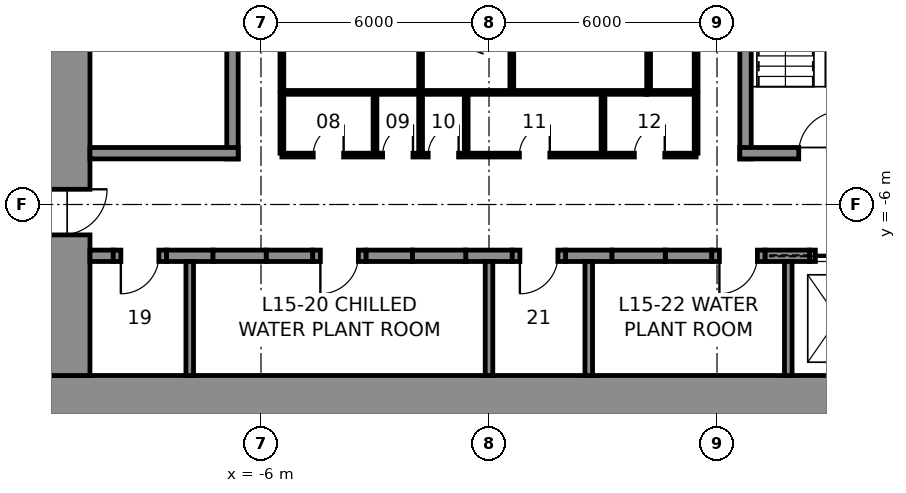
"""IFC4 building model, lengths in metres.
Left out: names, types, materials, properties, quantities, classifications, styles, units other than length and angle.
Written with IfcOpenShell. Run it as: python <this file> out.ifc"""

import sys

from ifc_helpers import new_model, si_unit, direction, frame, frame_2d, origin, place, context, subcontext, project, spatial, rectangle, extrude, element, fill, save


model = new_model("IFC4")
c1 = context("Model", 3, precision=1e-05, world=origin(), true_north=direction((0.0, 1.0)))
c2 = subcontext(c1, "Body", "Model", "MODEL_VIEW")
j1 = project(units=[si_unit("LENGTHUNIT", "METRE"), si_unit("PLANEANGLEUNIT", "RADIAN")], contexts=[c1])
p1 = place(None, origin())
s1 = spatial("IfcSite", under=j1, at=p1, CompositionType="ELEMENT")
p2 = place(p1, origin())
s2 = spatial("IfcBuilding", under=s1, at=p2, CompositionType="ELEMENT")
p3 = place(p2, frame((0.0, 0.0, 81.0)))
s3 = spatial("IfcBuildingStorey", under=s2, at=p3, CompositionType="ELEMENT", Elevation=81.0)
p4 = place(p3, frame((12.0, -11.25, 0.0), z_axis=(0.0, 0.0, 1.0), x_axis=(-1.0, 0.0, 0.0)))
e1 = element("IfcWall", 1, at=p4, inside=s3, PredefinedType="SHEAR", context=c2, shape_type="SweptSolid", body=[
    extrude(rectangle(XDim=24.0, YDim=1.5, at=frame_2d((12.0, 0.0))), origin(), (0.0, 0.0, 1.0), 5.0),
])
p5 = place(p3, frame((-11.25, -10.5, 0.0), z_axis=(0.0, 0.0, 1.0), x_axis=(0.0, 1.0, 0.0)))
e2 = element("IfcWall", 2, at=p5, inside=s3, PredefinedType="SHEAR", context=c2, shape_type="SweptSolid", body=[
    extrude(rectangle(XDim=21.0, YDim=1.5, at=frame_2d((10.5, 0.0))), origin(), (0.0, 0.0, 1.0), 5.0),
])
p6 = place(p5, frame((16.1, 0.0, 0.0)))
e3 = element("IfcOpeningElement", 3, at=p6, cuts=e2, PredefinedType="OPENING", context=c2, shape_type="SweptSolid", body=[
    extrude(rectangle(XDim=1.2, YDim=2.3, at=frame_2d((0.6, 1.15))), frame((0.0, 0.76, 0.0), z_axis=(0.0, -1.0, 0.0), x_axis=(1.0, 0.0, 0.0)), (0.0, 0.0, 1.0), 1.52),
])
p7 = place(p5, frame((3.7, 0.0, 0.0)))
e4 = element("IfcOpeningElement", 4, at=p7, cuts=e2, PredefinedType="OPENING", context=c2, shape_type="SweptSolid", body=[
    extrude(rectangle(XDim=1.2, YDim=2.3, at=frame_2d((0.6, 1.15))), frame((0.0, 0.76, 0.0), z_axis=(0.0, -1.0, 0.0), x_axis=(1.0, 0.0, 0.0)), (0.0, 0.0, 1.0), 1.52),
])
p8 = place(p3, frame((-10.5, -7.35, 0.0), z_axis=(0.0, 0.0, 1.0), x_axis=(1.0, 0.0, 0.0)))
e5 = element("IfcWall", 5, at=p8, inside=s3, PredefinedType="SHEAR", context=c2, shape_type="SweptSolid", body=[
    extrude(rectangle(XDim=0.613, YDim=0.3, at=frame_2d((0.306, 0.0))), origin(), (0.0, 0.0, 1.0), 5.0),
])
for number, where, z_axis, x_axis in (
    (6, (-8.488, -7.35, 0.0), (0.0, 0.0, 1.0), (1.0, 0.0, 0.0)),
    (7, (-5.863, -7.35, 0.0), (0.0, 0.0, 1.0), (1.0, 0.0, 0.0)),
    (8, (-3.238, -7.35, 0.0), (0.0, 0.0, 1.0), (1.0, 0.0, 0.0)),
    (9, (-0.613, -7.35, 0.0), (0.0, 0.0, 1.0), (1.0, 0.0, 0.0)),
    (10, (2.012, -7.35, 0.0), (0.0, 0.0, 1.0), (1.0, 0.0, 0.0)),
    (11, (4.637, -7.35, 0.0), (0.0, 0.0, 1.0), (1.0, 0.0, 0.0)),
):
    element("IfcWall", number, at=place(p3, frame(where, z_axis=z_axis, x_axis=x_axis)), inside=s3, PredefinedType="SHEAR", context=c2, shape_type="SweptSolid", body=[
        extrude(rectangle(XDim=1.225, YDim=0.3, at=frame_2d((0.613, 0.0))), origin(), (0.0, 0.0, 1.0), 5.0),
    ])
p9 = place(p3, frame((7.262, -7.35, 0.0), z_axis=(0.0, 0.0, 1.0), x_axis=(1.0, 0.0, 0.0)))
e12 = element("IfcWall", 12, at=p9, inside=s3, PredefinedType="SHEAR", context=c2, shape_type="SweptSolid", body=[
    extrude(rectangle(XDim=1.175, YDim=0.3, at=frame_2d((0.587, 0.0))), origin(), (0.0, 0.0, 1.0), 5.0),
])
p10 = place(p3, frame((-9.887, -7.35, 0.0), z_axis=(0.0, 0.0, 1.0), x_axis=(1.0, 0.0, 0.0)))
e13 = element("IfcWall", 13, at=p10, inside=s3, PredefinedType="PARTITIONING", context=c2, shape_type="SweptSolid", body=[
    extrude(rectangle(XDim=1.4, YDim=0.3, at=frame_2d((0.7, 0.0))), origin(), (0.0, 0.0, 1.0), 5.0),
])
p11 = place(p10, frame((0.2, 0.0, 0.0)))
e14 = element("IfcOpeningElement", 14, at=p11, cuts=e13, PredefinedType="OPENING", context=c2, shape_type="SweptSolid", body=[
    extrude(rectangle(XDim=1.0, YDim=2.3, at=frame_2d((0.5, 1.15))), frame((0.0, 0.16, 0.0), z_axis=(0.0, -1.0, 0.0), x_axis=(1.0, 0.0, 0.0)), (0.0, 0.0, 1.0), 0.32),
])
p12 = place(p3, frame((-7.262, -7.35, 0.0), z_axis=(0.0, 0.0, 1.0), x_axis=(1.0, 0.0, 0.0)))
e15 = element("IfcWall", 15, at=p12, inside=s3, PredefinedType="PARTITIONING", context=c2, shape_type="SweptSolid", body=[
    extrude(rectangle(XDim=1.4, YDim=0.3, at=frame_2d((0.7, 0.0))), origin(), (0.0, 0.0, 1.0), 5.0),
])
p13 = place(p3, frame((-4.637, -7.35, 0.0), z_axis=(0.0, 0.0, 1.0), x_axis=(1.0, 0.0, 0.0)))
e16 = element("IfcWall", 16, at=p13, inside=s3, PredefinedType="PARTITIONING", context=c2, shape_type="SweptSolid", body=[
    extrude(rectangle(XDim=1.4, YDim=0.3, at=frame_2d((0.7, 0.0))), origin(), (0.0, 0.0, 1.0), 5.0),
])
p14 = place(p13, frame((0.2, 0.0, 0.0)))
e17 = element("IfcOpeningElement", 17, at=p14, cuts=e16, PredefinedType="OPENING", context=c2, shape_type="SweptSolid", body=[
    extrude(rectangle(XDim=1.0, YDim=2.3, at=frame_2d((0.5, 1.15))), frame((0.0, 0.16, 0.0), z_axis=(0.0, -1.0, 0.0), x_axis=(1.0, 0.0, 0.0)), (0.0, 0.0, 1.0), 0.32),
])
p15 = place(p3, frame((-2.012, -7.35, 0.0), z_axis=(0.0, 0.0, 1.0), x_axis=(1.0, 0.0, 0.0)))
e18 = element("IfcWall", 18, at=p15, inside=s3, PredefinedType="PARTITIONING", context=c2, shape_type="SweptSolid", body=[
    extrude(rectangle(XDim=1.4, YDim=0.3, at=frame_2d((0.7, 0.0))), origin(), (0.0, 0.0, 1.0), 5.0),
])
p16 = place(p3, frame((0.613, -7.35, 0.0), z_axis=(0.0, 0.0, 1.0), x_axis=(1.0, 0.0, 0.0)))
e19 = element("IfcWall", 19, at=p16, inside=s3, PredefinedType="PARTITIONING", context=c2, shape_type="SweptSolid", body=[
    extrude(rectangle(XDim=1.4, YDim=0.3, at=frame_2d((0.7, 0.0))), origin(), (0.0, 0.0, 1.0), 5.0),
])
p17 = place(p16, frame((0.2, 0.0, 0.0)))
e20 = element("IfcOpeningElement", 20, at=p17, cuts=e19, PredefinedType="OPENING", context=c2, shape_type="SweptSolid", body=[
    extrude(rectangle(XDim=1.0, YDim=2.3, at=frame_2d((0.5, 1.15))), frame((0.0, 0.16, 0.0), z_axis=(0.0, -1.0, 0.0), x_axis=(1.0, 0.0, 0.0)), (0.0, 0.0, 1.0), 0.32),
])
p18 = place(p3, frame((3.238, -7.35, 0.0), z_axis=(0.0, 0.0, 1.0), x_axis=(1.0, 0.0, 0.0)))
e21 = element("IfcWall", 21, at=p18, inside=s3, PredefinedType="PARTITIONING", context=c2, shape_type="SweptSolid", body=[
    extrude(rectangle(XDim=1.4, YDim=0.3, at=frame_2d((0.7, 0.0))), origin(), (0.0, 0.0, 1.0), 5.0),
])
p19 = place(p3, frame((5.863, -7.35, 0.0), z_axis=(0.0, 0.0, 1.0), x_axis=(1.0, 0.0, 0.0)))
e22 = element("IfcWall", 22, at=p19, inside=s3, PredefinedType="PARTITIONING", context=c2, shape_type="SweptSolid", body=[
    extrude(rectangle(XDim=1.4, YDim=0.3, at=frame_2d((0.7, 0.0))), origin(), (0.0, 0.0, 1.0), 5.0),
])
p20 = place(p19, frame((0.2, 0.0, 0.0)))
e23 = element("IfcOpeningElement", 23, at=p20, cuts=e22, PredefinedType="OPENING", context=c2, shape_type="SweptSolid", body=[
    extrude(rectangle(XDim=1.0, YDim=2.3, at=frame_2d((0.5, 1.15))), frame((0.0, 0.16, 0.0), z_axis=(0.0, -1.0, 0.0), x_axis=(1.0, 0.0, 0.0)), (0.0, 0.0, 1.0), 0.32),
])
p21 = place(p3, frame((8.438, -7.35, 0.0), z_axis=(0.0, 0.0, 1.0), x_axis=(1.0, 0.0, 0.0)))
e24 = element("IfcWall", 24, at=p21, inside=s3, PredefinedType="PARTITIONING", context=c2, shape_type="SweptSolid", body=[
    extrude(rectangle(XDim=1.5, YDim=0.3, at=frame_2d((0.75, 0.0))), origin(), (0.0, 0.0, 1.0), 5.0),
])
p22 = place(p21, frame((0.15, 0.0, 0.0)))
e25 = element("IfcOpeningElement", 25, at=p22, cuts=e24, PredefinedType="OPENING", context=c2, shape_type="SweptSolid", body=[
    extrude(rectangle(XDim=1.2, YDim=2.3, at=frame_2d((0.6, 1.15))), frame((0.0, 0.16, 0.0), z_axis=(0.0, -1.0, 0.0), x_axis=(1.0, 0.0, 0.0)), (0.0, 0.0, 1.0), 0.32),
])
for number, where, z_axis, x_axis in (
    (26, (-7.875, -10.5, 0.0), (0.0, 0.0, 1.0), (0.0, 1.0, 0.0)),
    (27, (0.0, -10.5, 0.0), (0.0, 0.0, 1.0), (0.0, 1.0, 0.0)),
    (28, (2.625, -10.5, 0.0), (0.0, 0.0, 1.0), (0.0, 1.0, 0.0)),
    (29, (7.875, -10.5, 0.0), (0.0, 0.0, 1.0), (0.0, 1.0, 0.0)),
):
    element("IfcWall", number, at=place(p3, frame(where, z_axis=z_axis, x_axis=x_axis)), inside=s3, PredefinedType="PARTITIONING", context=c2, shape_type="SweptSolid", body=[
        extrude(rectangle(XDim=3.0, YDim=0.2, at=frame_2d((1.5, 0.0))), origin(), (0.0, 0.0, 1.0), 5.0),
    ])
p23 = place(p3, frame((-6.75, -4.8, 0.0), z_axis=(0.0, 0.0, 1.0), x_axis=(0.0, 1.0, 0.0)))
e30 = element("IfcWall", 30, at=p23, inside=s3, PredefinedType="SOLIDWALL", context=c2, shape_type="SweptSolid", body=[
    extrude(rectangle(XDim=9.6, YDim=0.3, at=frame_2d((4.8, 0.0))), origin(), (0.0, 0.0, 1.0), 4.75),
])
p24 = place(p3, frame((-6.6, -4.65, 0.0), z_axis=(0.0, 0.0, 1.0), x_axis=(-1.0, 0.0, 0.0)))
e31 = element("IfcWall", 31, at=p24, inside=s3, PredefinedType="SOLIDWALL", context=c2, shape_type="SweptSolid", body=[
    extrude(rectangle(XDim=3.9, YDim=0.3, at=frame_2d((1.95, 0.0))), origin(), (0.0, 0.0, 1.0), 4.75),
])
p25 = place(p3, frame((6.75, -4.8, 0.0), z_axis=(0.0, 0.0, 1.0), x_axis=(0.0, 1.0, 0.0)))
e32 = element("IfcWall", 32, at=p25, inside=s3, PredefinedType="SOLIDWALL", context=c2, shape_type="SweptSolid", body=[
    extrude(rectangle(XDim=9.6, YDim=0.3, at=frame_2d((4.8, 0.0))), origin(), (0.0, 0.0, 1.0), 4.75),
])
p26 = place(p3, frame((10.5, -4.65, 0.0), z_axis=(0.0, 0.0, 1.0), x_axis=(-1.0, 0.0, 0.0)))
e33 = element("IfcWall", 33, at=p26, inside=s3, PredefinedType="SOLIDWALL", context=c2, shape_type="SweptSolid", body=[
    extrude(rectangle(XDim=3.9, YDim=0.3, at=frame_2d((1.95, 0.0))), origin(), (0.0, 0.0, 1.0), 4.75),
])
p27 = place(p26, frame((1.25, 0.0, 0.0)))
e34 = element("IfcOpeningElement", 34, at=p27, cuts=e33, PredefinedType="OPENING", context=c2, shape_type="SweptSolid", body=[
    extrude(rectangle(XDim=1.1, YDim=2.3, at=frame_2d((0.55, 1.15))), frame((0.0, 0.16, 0.0), z_axis=(0.0, -1.0, 0.0), x_axis=(1.0, 0.0, 0.0)), (0.0, 0.0, 1.0), 0.32),
])
p28 = place(p3, frame((4.15, -3.05, 0.0), z_axis=(0.0, 0.0, 1.0), x_axis=(-1.0, 0.0, 0.0)))
e35 = element("IfcWall", 35, at=p28, inside=s3, PredefinedType="PARTITIONING", context=c2, shape_type="SweptSolid", body=[
    extrude(rectangle(XDim=9.6, YDim=0.1, at=frame_2d((4.8, 0.0))), origin(), (0.0, 0.0, 1.0), 4.75),
])
p29 = place(p3, frame((5.45, -3.05, 0.0), z_axis=(0.0, 0.0, 1.0), x_axis=(-1.0, 0.0, 0.0)))
e36 = element("IfcWall", 36, at=p29, inside=s3, PredefinedType="PARTITIONING", context=c2, shape_type="SweptSolid", body=[
    extrude(rectangle(XDim=1.3, YDim=0.1, at=frame_2d((0.65, 0.0))), origin(), (0.0, 0.0, 1.0), 4.75),
])
for number, where, z_axis, x_axis in (
    (37, (5.45, 3.0, 0.0), (0.0, 0.0, 1.0), (0.0, -1.0, 0.0)),
    (38, (-5.45, -3.0, 0.0), (0.0, 0.0, 1.0), (0.0, 1.0, 0.0)),
    (39, (-1.8, -3.0, 0.0), (0.0, 0.0, 1.0), (0.0, 1.0, 0.0)),
    (40, (0.6, -3.0, 0.0), (0.0, 0.0, 1.0), (0.0, 1.0, 0.0)),
    (41, (4.2, -3.0, 0.0), (0.0, 0.0, 1.0), (0.0, 1.0, 0.0)),
):
    element("IfcWall", number, at=place(p3, frame(where, z_axis=z_axis, x_axis=x_axis)), inside=s3, PredefinedType="PARTITIONING", context=c2, shape_type="SweptSolid", body=[
        extrude(rectangle(XDim=6.0, YDim=0.1, at=frame_2d((3.0, 0.0))), origin(), (0.0, 0.0, 1.0), 4.75),
    ])
p30 = place(p3, frame((5.45, -4.7, 0.0), z_axis=(0.0, 0.0, 1.0), x_axis=(-1.0, 0.0, 0.0)))
e42 = element("IfcWall", 42, at=p30, inside=s3, PredefinedType="PARTITIONING", context=c2, shape_type="SweptSolid", body=[
    extrude(rectangle(XDim=10.9, YDim=0.1, at=frame_2d((5.45, 0.0))), origin(), (0.0, 0.0, 1.0), 4.75),
])
p31 = place(p30, frame((9.275, 0.0, 0.0)))
e43 = element("IfcOpeningElement", 43, at=p31, cuts=e42, PredefinedType="OPENING", context=c2, shape_type="SweptSolid", body=[
    extrude(rectangle(XDim=0.8, YDim=2.3, at=frame_2d((0.4, 1.15))), frame((0.0, 0.06, 0.0), z_axis=(0.0, -1.0, 0.0), x_axis=(1.0, 0.0, 0.0)), (0.0, 0.0, 1.0), 0.12),
])
p32 = place(p30, frame((7.45, 0.0, 0.0)))
e44 = element("IfcOpeningElement", 44, at=p32, cuts=e42, PredefinedType="OPENING", context=c2, shape_type="SweptSolid", body=[
    extrude(rectangle(XDim=0.8, YDim=2.3, at=frame_2d((0.4, 1.15))), frame((0.0, 0.06, 0.0), z_axis=(0.0, -1.0, 0.0), x_axis=(1.0, 0.0, 0.0)), (0.0, 0.0, 1.0), 0.12),
])
p33 = place(p30, frame((6.25, 0.0, 0.0)))
e45 = element("IfcOpeningElement", 45, at=p33, cuts=e42, PredefinedType="OPENING", context=c2, shape_type="SweptSolid", body=[
    extrude(rectangle(XDim=0.8, YDim=2.3, at=frame_2d((0.4, 1.15))), frame((0.0, 0.06, 0.0), z_axis=(0.0, -1.0, 0.0), x_axis=(1.0, 0.0, 0.0)), (0.0, 0.0, 1.0), 0.12),
])
p34 = place(p30, frame((3.85, 0.0, 0.0)))
e46 = element("IfcOpeningElement", 46, at=p34, cuts=e42, PredefinedType="OPENING", context=c2, shape_type="SweptSolid", body=[
    extrude(rectangle(XDim=0.8, YDim=2.3, at=frame_2d((0.4, 1.15))), frame((0.0, 0.06, 0.0), z_axis=(0.0, -1.0, 0.0), x_axis=(1.0, 0.0, 0.0)), (0.0, 0.0, 1.0), 0.12),
])
p35 = place(p30, frame((0.825, 0.0, 0.0)))
e47 = element("IfcOpeningElement", 47, at=p35, cuts=e42, PredefinedType="OPENING", context=c2, shape_type="SweptSolid", body=[
    extrude(rectangle(XDim=0.8, YDim=2.3, at=frame_2d((0.4, 1.15))), frame((0.0, 0.06, 0.0), z_axis=(0.0, -1.0, 0.0), x_axis=(1.0, 0.0, 0.0)), (0.0, 0.0, 1.0), 0.12),
])
for number, where, z_axis, x_axis in (
    (48, (-5.45, -3.1, 0.0), (0.0, 0.0, 1.0), (0.0, -1.0, 0.0)),
    (49, (5.45, -3.1, 0.0), (0.0, 0.0, 1.0), (0.0, -1.0, 0.0)),
    (50, (-3.0, -3.1, 0.0), (0.0, 0.0, 1.0), (0.0, -1.0, 0.0)),
    (51, (-1.8, -3.1, 0.0), (0.0, 0.0, 1.0), (0.0, -1.0, 0.0)),
    (52, (-0.6, -3.1, 0.0), (0.0, 0.0, 1.0), (0.0, -1.0, 0.0)),
    (53, (3.0, -3.1, 0.0), (0.0, 0.0, 1.0), (0.0, -1.0, 0.0)),
):
    element("IfcWall", number, at=place(p3, frame(where, z_axis=z_axis, x_axis=x_axis)), inside=s3, PredefinedType="PARTITIONING", context=c2, shape_type="SweptSolid", body=[
        extrude(rectangle(XDim=1.55, YDim=0.1, at=frame_2d((0.775, 0.0))), origin(), (0.0, 0.0, 1.0), 4.75),
    ])
p36 = place(p27, frame((1.1, 0.0, 0.0), z_axis=(0.0, 0.0, 1.0), x_axis=(-1.0, 0.0, 0.0)))
e54 = element("IfcDoor", 54, at=p36, inside=s3, OperationType="SINGLE_SWING_RIGHT", PredefinedType="DOOR", context=c2, shape_type="SweptSolid", body=[
    extrude(rectangle(XDim=1.1, YDim=2.3, at=frame_2d((0.55, 1.15))), frame((0.0, 0.025, 0.0), z_axis=(0.0, -1.0, 0.0), x_axis=(1.0, 0.0, 0.0)), (0.0, 0.0, 1.0), 0.05),
])
fill(e34, e54)
p37 = place(p31, frame((0.8, 0.0, 0.0), z_axis=(0.0, 0.0, 1.0), x_axis=(-1.0, 0.0, 0.0)))
e55 = element("IfcDoor", 55, at=p37, inside=s3, OperationType="SINGLE_SWING_RIGHT", PredefinedType="DOOR", context=c2, shape_type="SweptSolid", body=[
    extrude(rectangle(XDim=0.8, YDim=2.3, at=frame_2d((0.4, 1.15))), frame((0.0, 0.025, 0.0), z_axis=(0.0, -1.0, 0.0), x_axis=(1.0, 0.0, 0.0)), (0.0, 0.0, 1.0), 0.05),
])
fill(e43, e55)
p38 = place(p32, frame((0.8, 0.0, 0.0), z_axis=(0.0, 0.0, 1.0), x_axis=(-1.0, 0.0, 0.0)))
e56 = element("IfcDoor", 56, at=p38, inside=s3, OperationType="SINGLE_SWING_RIGHT", PredefinedType="DOOR", context=c2, shape_type="SweptSolid", body=[
    extrude(rectangle(XDim=0.8, YDim=2.3, at=frame_2d((0.4, 1.15))), frame((0.0, 0.025, 0.0), z_axis=(0.0, -1.0, 0.0), x_axis=(1.0, 0.0, 0.0)), (0.0, 0.0, 1.0), 0.05),
])
fill(e44, e56)
p39 = place(p33, frame((0.8, 0.0, 0.0), z_axis=(0.0, 0.0, 1.0), x_axis=(-1.0, 0.0, 0.0)))
e57 = element("IfcDoor", 57, at=p39, inside=s3, OperationType="SINGLE_SWING_RIGHT", PredefinedType="DOOR", context=c2, shape_type="SweptSolid", body=[
    extrude(rectangle(XDim=0.8, YDim=2.3, at=frame_2d((0.4, 1.15))), frame((0.0, 0.025, 0.0), z_axis=(0.0, -1.0, 0.0), x_axis=(1.0, 0.0, 0.0)), (0.0, 0.0, 1.0), 0.05),
])
fill(e45, e57)
p40 = place(p34, frame((0.8, 0.0, 0.0), z_axis=(0.0, 0.0, 1.0), x_axis=(-1.0, 0.0, 0.0)))
e58 = element("IfcDoor", 58, at=p40, inside=s3, OperationType="SINGLE_SWING_RIGHT", PredefinedType="DOOR", context=c2, shape_type="SweptSolid", body=[
    extrude(rectangle(XDim=0.8, YDim=2.3, at=frame_2d((0.4, 1.15))), frame((0.0, 0.025, 0.0), z_axis=(0.0, -1.0, 0.0), x_axis=(1.0, 0.0, 0.0)), (0.0, 0.0, 1.0), 0.05),
])
fill(e46, e58)
p41 = place(p35, frame((0.8, 0.0, 0.0), z_axis=(0.0, 0.0, 1.0), x_axis=(-1.0, 0.0, 0.0)))
e59 = element("IfcDoor", 59, at=p41, inside=s3, OperationType="SINGLE_SWING_RIGHT", PredefinedType="DOOR", context=c2, shape_type="SweptSolid", body=[
    extrude(rectangle(XDim=0.8, YDim=2.3, at=frame_2d((0.4, 1.15))), frame((0.0, 0.025, 0.0), z_axis=(0.0, -1.0, 0.0), x_axis=(1.0, 0.0, 0.0)), (0.0, 0.0, 1.0), 0.05),
])
fill(e47, e59)
p42 = place(p11, frame((1.0, 0.0, 0.0), z_axis=(0.0, 0.0, 1.0), x_axis=(-1.0, 0.0, 0.0)))
e60 = element("IfcDoor", 60, at=p42, inside=s3, OperationType="SINGLE_SWING_RIGHT", PredefinedType="DOOR", context=c2, shape_type="SweptSolid", body=[
    extrude(rectangle(XDim=1.0, YDim=2.3, at=frame_2d((0.5, 1.15))), frame((0.0, 0.025, 0.0), z_axis=(0.0, -1.0, 0.0), x_axis=(1.0, 0.0, 0.0)), (0.0, 0.0, 1.0), 0.05),
])
fill(e14, e60)
p43 = place(p14, frame((1.0, 0.0, 0.0), z_axis=(0.0, 0.0, 1.0), x_axis=(-1.0, 0.0, 0.0)))
e61 = element("IfcDoor", 61, at=p43, inside=s3, OperationType="SINGLE_SWING_RIGHT", PredefinedType="DOOR", context=c2, shape_type="SweptSolid", body=[
    extrude(rectangle(XDim=1.0, YDim=2.3, at=frame_2d((0.5, 1.15))), frame((0.0, 0.025, 0.0), z_axis=(0.0, -1.0, 0.0), x_axis=(1.0, 0.0, 0.0)), (0.0, 0.0, 1.0), 0.05),
])
fill(e17, e61)
p44 = place(p17, frame((1.0, 0.0, 0.0), z_axis=(0.0, 0.0, 1.0), x_axis=(-1.0, 0.0, 0.0)))
e62 = element("IfcDoor", 62, at=p44, inside=s3, OperationType="SINGLE_SWING_RIGHT", PredefinedType="DOOR", context=c2, shape_type="SweptSolid", body=[
    extrude(rectangle(XDim=1.0, YDim=2.3, at=frame_2d((0.5, 1.15))), frame((0.0, 0.025, 0.0), z_axis=(0.0, -1.0, 0.0), x_axis=(1.0, 0.0, 0.0)), (0.0, 0.0, 1.0), 0.05),
])
fill(e20, e62)
p45 = place(p20, frame((1.0, 0.0, 0.0), z_axis=(0.0, 0.0, 1.0), x_axis=(-1.0, 0.0, 0.0)))
e63 = element("IfcDoor", 63, at=p45, inside=s3, OperationType="SINGLE_SWING_RIGHT", PredefinedType="DOOR", context=c2, shape_type="SweptSolid", body=[
    extrude(rectangle(XDim=1.0, YDim=2.3, at=frame_2d((0.5, 1.15))), frame((0.0, 0.025, 0.0), z_axis=(0.0, -1.0, 0.0), x_axis=(1.0, 0.0, 0.0)), (0.0, 0.0, 1.0), 0.05),
])
fill(e23, e63)
p46 = place(p7, frame((1.2, 0.0, 0.0), z_axis=(0.0, 0.0, 1.0), x_axis=(-1.0, 0.0, 0.0)))
e64 = element("IfcDoor", 64, at=p46, inside=s3, OperationType="SINGLE_SWING_LEFT", PredefinedType="DOOR", context=c2, shape_type="SweptSolid", body=[
    extrude(rectangle(XDim=1.2, YDim=2.3, at=frame_2d((0.6, 1.15))), frame((0.0, 0.025, 0.0), z_axis=(0.0, -1.0, 0.0), x_axis=(1.0, 0.0, 0.0)), (0.0, 0.0, 1.0), 0.05),
])
fill(e4, e64)
p47 = place(p22, origin())
e65 = element("IfcDoor", 65, at=p47, inside=s3, OperationType="SLIDING_TO_LEFT", PredefinedType="DOOR", context=c2, shape_type="SweptSolid", body=[
    extrude(rectangle(XDim=1.2, YDim=2.3, at=frame_2d((0.6, 1.15))), frame((0.0, 0.025, 0.0), z_axis=(0.0, -1.0, 0.0), x_axis=(1.0, 0.0, 0.0)), (0.0, 0.0, 1.0), 0.05),
])
fill(e25, e65)
save(model, sys.argv[1])
